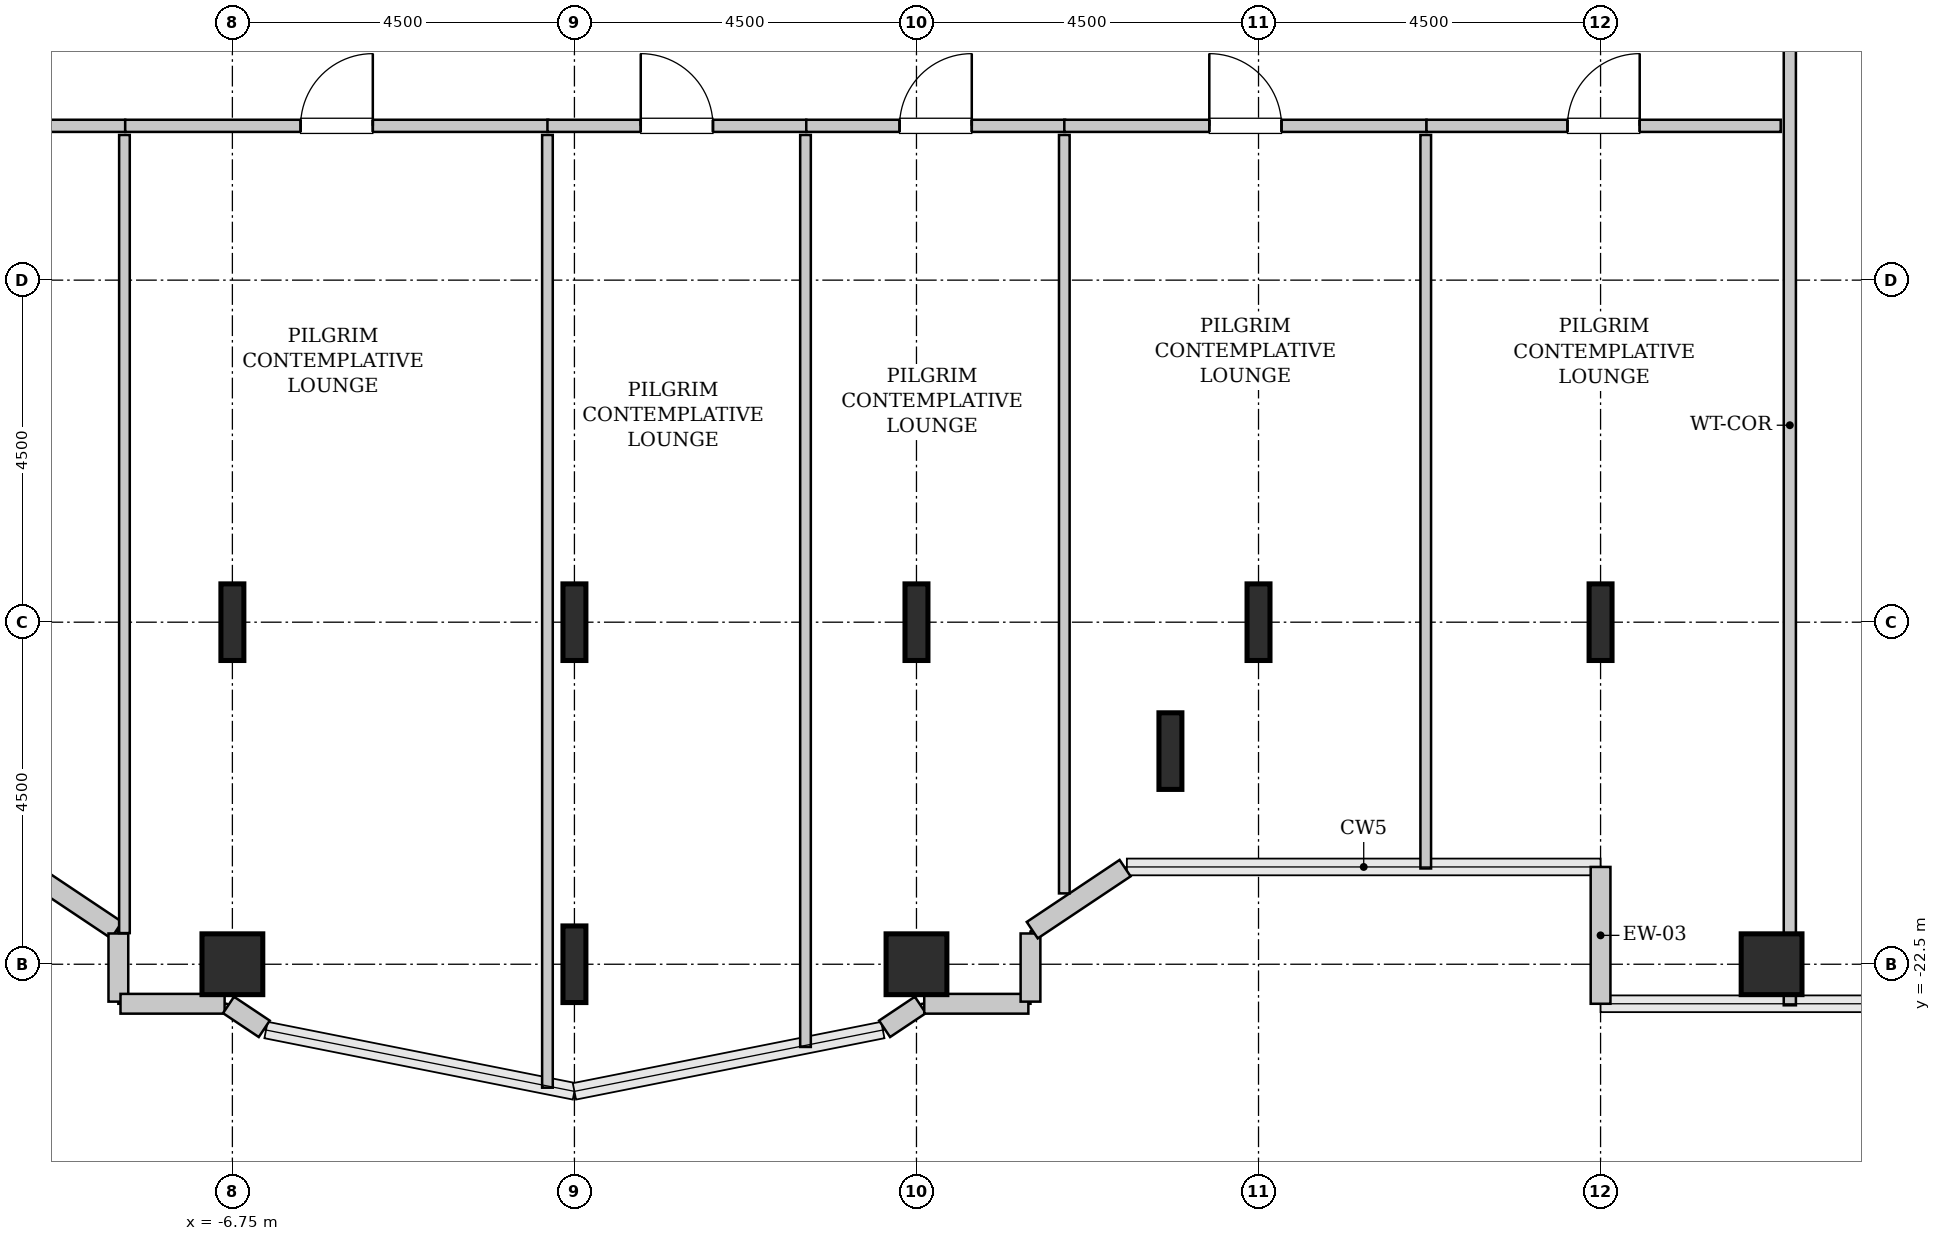
"""IFC4 building model, lengths in metres.
Left out: names, types, materials, properties, quantities, classifications, styles, units other than length and angle.
Written with IfcOpenShell. Run it as: python <this file> out.ifc"""

import sys

from ifc_helpers import new_model, si_unit, direction, frame, frame_2d, origin, origin_2d, place, context, subcontext, project, spatial, rectangle, hollow_rectangle, i_section, extrude, source, transform, mapped, element, fill, save


model = new_model("IFC4")
c1 = context("Model", 3, precision=1e-05, world=origin(), true_north=direction((0.0, 1.0)))
c2 = subcontext(c1, "Body", "Model", "MODEL_VIEW")
j1 = project(units=[si_unit("LENGTHUNIT", "METRE"), si_unit("PLANEANGLEUNIT", "RADIAN")], contexts=[c1])
p1 = place(None, origin())
s1 = spatial("IfcSite", under=j1, at=p1, CompositionType="ELEMENT")
p2 = place(p1, origin())
s2 = spatial("IfcBuilding", under=s1, at=p2, CompositionType="ELEMENT")
p3 = place(p2, frame((0.0, 0.0, 109.8)))
s3 = spatial("IfcBuildingStorey", under=s2, at=p3, CompositionType="ELEMENT", Elevation=109.8)
m1 = source(origin(), c2, "Body", "SweptSolid", [
    extrude(hollow_rectangle(XDim=0.8, YDim=0.8, WallThickness=0.04, InnerFilletRadius=0.04, OuterFilletRadius=0.08, at=origin_2d()), origin(), (0.0, 0.0, 1.0), 3.8),
])
p4 = place(p3, frame((-6.75, -22.5, 0.0), z_axis=(0.0, 0.0, 1.0), x_axis=(1.0, 0.0, 0.0)))
e1 = element("IfcColumn", 1, at=p4, inside=s3, PredefinedType="COLUMN", context=c2, shape_type="MappedRepresentation", body=[
    mapped(m1, transform((0.0, 0.0, 0.0), x_axis=(1.0, 0.0, 0.0), y_axis=(0.0, 1.0, 0.0), z_axis=(0.0, 0.0, 1.0), scale=1.0)),
])
m2 = source(origin(), c2, "Body", "SweptSolid", [
    extrude(i_section(OverallWidth=0.302, OverallDepth=1.008, WebThickness=0.021, FlangeThickness=0.04, FilletRadius=0.03, at=origin_2d()), origin(), (0.0, 0.0, 1.0), 3.8),
])
for number, where, z_axis, x_axis in (
    (2, (-6.75, -18.0, 0.0), (0.0, 0.0, 1.0), (1.0, 0.0, 0.0)),
    (3, (-2.25, -22.5, 0.0), (0.0, 0.0, 1.0), (1.0, 0.0, 0.0)),
    (4, (-2.25, -18.0, 0.0), (0.0, 0.0, 1.0), (1.0, 0.0, 0.0)),
):
    element("IfcColumn", number, at=place(p3, frame(where, z_axis=z_axis, x_axis=x_axis)), inside=s3, PredefinedType="COLUMN", context=c2, shape_type="MappedRepresentation", body=[
        mapped(m2, transform((0.0, 0.0, 0.0), x_axis=(1.0, 0.0, 0.0), y_axis=(0.0, 1.0, 0.0), z_axis=(0.0, 0.0, 1.0), scale=1.0)),
    ])
p5 = place(p3, frame((2.25, -22.5, 0.0), z_axis=(0.0, 0.0, 1.0), x_axis=(1.0, 0.0, 0.0)))
e5 = element("IfcColumn", 5, at=p5, inside=s3, PredefinedType="COLUMN", context=c2, shape_type="MappedRepresentation", body=[
    mapped(m1, transform((0.0, 0.0, 0.0), x_axis=(1.0, 0.0, 0.0), y_axis=(0.0, 1.0, 0.0), z_axis=(0.0, 0.0, 1.0), scale=1.0)),
])
for number, where, z_axis, x_axis in (
    (6, (2.25, -18.0, 0.0), (0.0, 0.0, 1.0), (1.0, 0.0, 0.0)),
    (7, (5.591, -19.696, 0.0), (0.0, 0.0, 1.0), (1.0, 0.0, 0.0)),
    (8, (6.75, -18.0, 0.0), (0.0, 0.0, 1.0), (1.0, 0.0, 0.0)),
    (9, (11.25, -18.0, 0.0), (0.0, 0.0, 1.0), (1.0, 0.0, 0.0)),
):
    element("IfcColumn", number, at=place(p3, frame(where, z_axis=z_axis, x_axis=x_axis)), inside=s3, PredefinedType="COLUMN", context=c2, shape_type="MappedRepresentation", body=[
        mapped(m2, transform((0.0, 0.0, 0.0), x_axis=(1.0, 0.0, 0.0), y_axis=(0.0, 1.0, 0.0), z_axis=(0.0, 0.0, 1.0), scale=1.0)),
    ])
p6 = place(p3, frame((13.5, -22.5, 0.0), z_axis=(0.0, 0.0, 1.0), x_axis=(1.0, 0.0, 0.0)))
e10 = element("IfcColumn", 10, at=p6, inside=s3, PredefinedType="COLUMN", context=c2, shape_type="MappedRepresentation", body=[
    mapped(m1, transform((0.0, 0.0, 0.0), x_axis=(1.0, 0.0, 0.0), y_axis=(0.0, 1.0, 0.0), z_axis=(0.0, 0.0, 1.0), scale=1.0)),
])
m3 = source(origin(), c2, "Body", "SweptSolid", [
    extrude(rectangle(XDim=1.8, YDim=0.26, at=frame_2d((0.9, 0.0))), origin(), (0.0, 0.0, 1.0), 3.55),
])
p7 = place(p3, frame((11.25, -21.22, 0.0), z_axis=(0.0, 0.0, 1.0), x_axis=(0.0, -1.0, 0.0)))
e11 = element("IfcWall", 11, at=p7, inside=s3, PredefinedType="SOLIDWALL", context=c2, shape_type="MappedRepresentation", body=[
    mapped(m3, transform((0.0, 0.0, 0.0), x_axis=(1.0, 0.0, 0.0), y_axis=(0.0, 1.0, 0.0), z_axis=(0.0, 0.0, 1.0), scale=1.0)),
])
m4 = source(origin(), c2, "Body", "SweptSolid", [
    extrude(rectangle(XDim=1.469, YDim=0.26, at=frame_2d((0.734, 0.0))), origin(), (0.0, 0.0, 1.0), 3.55),
])
p8 = place(p3, frame((-9.495, -21.236, 0.0), z_axis=(0.0, 0.0, 1.0), x_axis=(0.831461760506, -0.555581983884, 0.0)))
e12 = element("IfcWall", 12, at=p8, inside=s3, PredefinedType="SOLIDWALL", context=c2, shape_type="MappedRepresentation", body=[
    mapped(m4, transform((0.0, 0.0, 0.0), x_axis=(1.0, 0.0, 0.0), y_axis=(0.0, 1.0, 0.0), z_axis=(0.0, 0.0, 1.0), scale=1.0)),
])
m5 = source(origin(), c2, "Body", "SweptSolid", [
    extrude(rectangle(XDim=0.897, YDim=0.26, at=frame_2d((0.448, 0.0))), origin(), (0.0, 0.0, 1.0), 3.55),
])
p9 = place(p3, frame((-8.25, -22.095, 0.0), z_axis=(0.0, 0.0, 1.0), x_axis=(0.0, -1.0, 0.0)))
e13 = element("IfcWall", 13, at=p9, inside=s3, PredefinedType="SOLIDWALL", context=c2, shape_type="MappedRepresentation", body=[
    mapped(m5, transform((0.0, 0.0, 0.0), x_axis=(1.0, 0.0, 0.0), y_axis=(0.0, 1.0, 0.0), z_axis=(0.0, 0.0, 1.0), scale=1.0)),
])
m6 = source(origin(), c2, "Body", "SweptSolid", [
    extrude(rectangle(XDim=1.37, YDim=0.26, at=frame_2d((0.685, 0.0))), origin(), (0.0, 0.0, 1.0), 3.55),
])
p10 = place(p3, frame((-8.222, -23.02, 0.0), z_axis=(0.0, 0.0, 1.0), x_axis=(1.0, 0.0, 0.0)))
e14 = element("IfcWall", 14, at=p10, inside=s3, PredefinedType="SOLIDWALL", context=c2, shape_type="MappedRepresentation", body=[
    mapped(m6, transform((0.0, 0.0, 0.0), x_axis=(1.0, 0.0, 0.0), y_axis=(0.0, 1.0, 0.0), z_axis=(0.0, 0.0, 1.0), scale=1.0)),
])
m7 = source(origin(), c2, "Body", "SweptSolid", [
    extrude(rectangle(XDim=0.565, YDim=0.26, at=frame_2d((0.283, 0.0))), origin(), (0.0, 0.0, 1.0), 3.55),
])
for number, where, z_axis, x_axis in (
    (15, (-6.801, -23.036, 0.0), (0.0, 0.0, 1.0), (0.832, -0.555, 0.0)),
    (16, (1.831, -23.35, 0.0), (0.0, 0.0, 1.0), (0.832, 0.555, 0.0)),
):
    element("IfcWall", number, at=place(p3, frame(where, z_axis=z_axis, x_axis=x_axis)), inside=s3, PredefinedType="SOLIDWALL", context=c2, shape_type="MappedRepresentation", body=[
        mapped(m7, transform((0.0, 0.0, 0.0), x_axis=(1.0, 0.0, 0.0), y_axis=(0.0, 1.0, 0.0), z_axis=(0.0, 0.0, 1.0), scale=1.0)),
    ])
p11 = place(p3, frame((2.352, -23.02, 0.0), z_axis=(0.0, 0.0, 1.0), x_axis=(1.0, 0.0, 0.0)))
e17 = element("IfcWall", 17, at=p11, inside=s3, PredefinedType="SOLIDWALL", context=c2, shape_type="MappedRepresentation", body=[
    mapped(m6, transform((0.0, 0.0, 0.0), x_axis=(1.0, 0.0, 0.0), y_axis=(0.0, 1.0, 0.0), z_axis=(0.0, 0.0, 1.0), scale=1.0)),
])
p12 = place(p3, frame((3.75, -22.992, 0.0), z_axis=(0.0, 0.0, 1.0), x_axis=(0.0, 1.0, 0.0)))
e18 = element("IfcWall", 18, at=p12, inside=s3, PredefinedType="SOLIDWALL", context=c2, shape_type="MappedRepresentation", body=[
    mapped(m5, transform((0.0, 0.0, 0.0), x_axis=(1.0, 0.0, 0.0), y_axis=(0.0, 1.0, 0.0), z_axis=(0.0, 0.0, 1.0), scale=1.0)),
])
p13 = place(p3, frame((3.773, -22.052, 0.0), z_axis=(0.0, 0.0, 1.0), x_axis=(0.831461760506, 0.555581983884, 0.0)))
e19 = element("IfcWall", 19, at=p13, inside=s3, PredefinedType="SOLIDWALL", context=c2, shape_type="MappedRepresentation", body=[
    mapped(m4, transform((0.0, 0.0, 0.0), x_axis=(1.0, 0.0, 0.0), y_axis=(0.0, 1.0, 0.0), z_axis=(0.0, 0.0, 1.0), scale=1.0)),
])
m8 = source(origin(), c2, "Body", "SweptSolid", [
    extrude(rectangle(XDim=19.845, YDim=0.16, at=frame_2d((9.922, 0.0))), origin(), (0.0, 0.0, 1.0), 3.535),
])
p14 = place(p3, frame((13.74, -23.04, 0.0), z_axis=(0.0, 0.0, 1.0), x_axis=(0.0, 1.0, 0.0)))
e20 = element("IfcWall", 20, at=p14, inside=s3, PredefinedType="PARTITIONING", context=c2, shape_type="MappedRepresentation", body=[
    mapped(m8, transform((0.0, 0.0, 0.0), x_axis=(1.0, 0.0, 0.0), y_axis=(0.0, 1.0, 0.0), z_axis=(0.0, 0.0, 1.0), scale=1.0)),
])
p15 = place(p14, frame((15.212, 0.0, 0.0)))
e21 = element("IfcOpeningElement", 21, at=p15, cuts=e20, PredefinedType="OPENING", context=c2, shape_type="SweptSolid", body=[
    extrude(rectangle(XDim=0.95, YDim=2.1, at=frame_2d((0.475, 1.05))), frame((0.0, 0.09, 0.0), z_axis=(0.0, -1.0, 0.0), x_axis=(1.0, 0.0, 0.0)), (0.0, 0.0, 1.0), 0.18),
])
m9 = source(origin(), c2, "Body", "SweptSolid", [
    extrude(rectangle(XDim=5.46, YDim=0.16, at=frame_2d((2.73, 0.0))), origin(), (0.0, 0.0, 1.0), 3.535),
])
p16 = place(p3, frame((-13.62, -11.47, 0.0), z_axis=(0.0, 0.0, 1.0), x_axis=(1.0, 0.0, 0.0)))
e22 = element("IfcWall", 22, at=p16, inside=s3, PredefinedType="PARTITIONING", context=c2, shape_type="MappedRepresentation", body=[
    mapped(m9, transform((0.0, 0.0, 0.0), x_axis=(1.0, 0.0, 0.0), y_axis=(0.0, 1.0, 0.0), z_axis=(0.0, 0.0, 1.0), scale=1.0)),
])
p17 = place(p16, frame((2.255, 0.0, 0.0)))
e23 = element("IfcOpeningElement", 23, at=p17, cuts=e22, PredefinedType="OPENING", context=c2, shape_type="SweptSolid", body=[
    extrude(rectangle(XDim=0.95, YDim=2.1, at=frame_2d((0.475, 1.05))), frame((0.0, 0.09, 0.0), z_axis=(0.0, -1.0, 0.0), x_axis=(1.0, 0.0, 0.0)), (0.0, 0.0, 1.0), 0.18),
])
m10 = source(origin(), c2, "Body", "SweptSolid", [
    extrude(rectangle(XDim=10.5, YDim=0.14, at=frame_2d((5.25, 0.0))), origin(), (0.0, 0.0, 1.0), 3.535),
])
p18 = place(p3, frame((-8.17, -22.09, 0.0), z_axis=(0.0, 0.0, 1.0), x_axis=(0.0, 1.0, 0.0)))
e24 = element("IfcWall", 24, at=p18, inside=s3, PredefinedType="PARTITIONING", context=c2, shape_type="MappedRepresentation", body=[
    mapped(m10, transform((0.0, 0.0, 0.0), x_axis=(1.0, 0.0, 0.0), y_axis=(0.0, 1.0, 0.0), z_axis=(0.0, 0.0, 1.0), scale=1.0)),
])
m11 = source(origin(), c2, "Body", "SweptSolid", [
    extrude(rectangle(XDim=5.565, YDim=0.16, at=frame_2d((2.782, 0.0))), origin(), (0.0, 0.0, 1.0), 3.535),
])
p19 = place(p3, frame((-8.16, -11.47, 0.0), z_axis=(0.0, 0.0, 1.0), x_axis=(1.0, 0.0, 0.0)))
e25 = element("IfcWall", 25, at=p19, inside=s3, PredefinedType="PARTITIONING", context=c2, shape_type="MappedRepresentation", body=[
    mapped(m11, transform((0.0, 0.0, 0.0), x_axis=(1.0, 0.0, 0.0), y_axis=(0.0, 1.0, 0.0), z_axis=(0.0, 0.0, 1.0), scale=1.0)),
])
p20 = place(p19, frame((2.308, 0.0, 0.0)))
e26 = element("IfcOpeningElement", 26, at=p20, cuts=e25, PredefinedType="OPENING", context=c2, shape_type="SweptSolid", body=[
    extrude(rectangle(XDim=0.95, YDim=2.1, at=frame_2d((0.475, 1.05))), frame((0.0, 0.09, 0.0), z_axis=(0.0, -1.0, 0.0), x_axis=(1.0, 0.0, 0.0)), (0.0, 0.0, 1.0), 0.18),
])
m12 = source(origin(), c2, "Body", "SweptSolid", [
    extrude(rectangle(XDim=12.534, YDim=0.14, at=frame_2d((6.267, 0.0))), origin(), (0.0, 0.0, 1.0), 2.875),
])
p21 = place(p3, frame((-2.605, -24.124, 0.0), z_axis=(0.0, 0.0, 1.0), x_axis=(0.0, 1.0, 0.0)))
e27 = element("IfcWall", 27, at=p21, inside=s3, PredefinedType="PARTITIONING", context=c2, shape_type="MappedRepresentation", body=[
    mapped(m12, transform((0.0, 0.0, 0.0), x_axis=(1.0, 0.0, 0.0), y_axis=(0.0, 1.0, 0.0), z_axis=(0.0, 0.0, 1.0), scale=1.0)),
])
m13 = source(origin(), c2, "Body", "SweptSolid", [
    extrude(rectangle(XDim=3.405, YDim=0.16, at=frame_2d((1.703, 0.0))), origin(), (0.0, 0.0, 1.0), 3.535),
])
p22 = place(p3, frame((-2.605, -11.47, 0.0), z_axis=(0.0, 0.0, 1.0), x_axis=(1.0, 0.0, 0.0)))
e28 = element("IfcWall", 28, at=p22, inside=s3, PredefinedType="PARTITIONING", context=c2, shape_type="MappedRepresentation", body=[
    mapped(m13, transform((0.0, 0.0, 0.0), x_axis=(1.0, 0.0, 0.0), y_axis=(0.0, 1.0, 0.0), z_axis=(0.0, 0.0, 1.0), scale=1.0)),
])
p23 = place(p22, frame((1.228, 0.0, 0.0)))
e29 = element("IfcOpeningElement", 29, at=p23, cuts=e28, PredefinedType="OPENING", context=c2, shape_type="SweptSolid", body=[
    extrude(rectangle(XDim=0.95, YDim=2.1, at=frame_2d((0.475, 1.05))), frame((0.0, 0.09, 0.0), z_axis=(0.0, -1.0, 0.0), x_axis=(1.0, 0.0, 0.0)), (0.0, 0.0, 1.0), 0.18),
])
m14 = source(origin(), c2, "Body", "SweptSolid", [
    extrude(rectangle(XDim=11.998, YDim=0.14, at=frame_2d((5.999, 0.0))), origin(), (0.0, 0.0, 1.0), 3.535),
])
p24 = place(p3, frame((0.79, -23.588, 0.0), z_axis=(0.0, 0.0, 1.0), x_axis=(0.0, 1.0, 0.0)))
e30 = element("IfcWall", 30, at=p24, inside=s3, PredefinedType="PARTITIONING", context=c2, shape_type="MappedRepresentation", body=[
    mapped(m14, transform((0.0, 0.0, 0.0), x_axis=(1.0, 0.0, 0.0), y_axis=(0.0, 1.0, 0.0), z_axis=(0.0, 0.0, 1.0), scale=1.0)),
])
p25 = place(p3, frame((0.8, -11.47, 0.0), z_axis=(0.0, 0.0, 1.0), x_axis=(1.0, 0.0, 0.0)))
e31 = element("IfcWall", 31, at=p25, inside=s3, PredefinedType="PARTITIONING", context=c2, shape_type="MappedRepresentation", body=[
    mapped(m13, transform((0.0, 0.0, 0.0), x_axis=(1.0, 0.0, 0.0), y_axis=(0.0, 1.0, 0.0), z_axis=(0.0, 0.0, 1.0), scale=1.0)),
])
p26 = place(p25, frame((1.228, 0.0, 0.0)))
e32 = element("IfcOpeningElement", 32, at=p26, cuts=e31, PredefinedType="OPENING", context=c2, shape_type="SweptSolid", body=[
    extrude(rectangle(XDim=0.95, YDim=2.1, at=frame_2d((0.475, 1.05))), frame((0.0, 0.09, 0.0), z_axis=(0.0, -1.0, 0.0), x_axis=(1.0, 0.0, 0.0)), (0.0, 0.0, 1.0), 0.18),
])
m15 = source(origin(), c2, "Body", "SweptSolid", [
    extrude(rectangle(XDim=9.978, YDim=0.14, at=frame_2d((4.989, 0.0))), origin(), (0.0, 0.0, 1.0), 3.535),
])
p27 = place(p3, frame((4.195, -21.568, 0.0), z_axis=(0.0, 0.0, 1.0), x_axis=(0.0, 1.0, 0.0)))
e33 = element("IfcWall", 33, at=p27, inside=s3, PredefinedType="PARTITIONING", context=c2, shape_type="MappedRepresentation", body=[
    mapped(m15, transform((0.0, 0.0, 0.0), x_axis=(1.0, 0.0, 0.0), y_axis=(0.0, 1.0, 0.0), z_axis=(0.0, 0.0, 1.0), scale=1.0)),
])
m16 = source(origin(), c2, "Body", "SweptSolid", [
    extrude(rectangle(XDim=4.765, YDim=0.16, at=frame_2d((2.382, 0.0))), origin(), (0.0, 0.0, 1.0), 3.535),
])
p28 = place(p3, frame((4.195, -11.47, 0.0), z_axis=(0.0, 0.0, 1.0), x_axis=(1.0, 0.0, 0.0)))
e34 = element("IfcWall", 34, at=p28, inside=s3, PredefinedType="PARTITIONING", context=c2, shape_type="MappedRepresentation", body=[
    mapped(m16, transform((0.0, 0.0, 0.0), x_axis=(1.0, 0.0, 0.0), y_axis=(0.0, 1.0, 0.0), z_axis=(0.0, 0.0, 1.0), scale=1.0)),
])
p29 = place(p28, frame((1.907, 0.0, 0.0)))
e35 = element("IfcOpeningElement", 35, at=p29, cuts=e34, PredefinedType="OPENING", context=c2, shape_type="SweptSolid", body=[
    extrude(rectangle(XDim=0.95, YDim=2.1, at=frame_2d((0.475, 1.05))), frame((0.0, 0.09, 0.0), z_axis=(0.0, -1.0, 0.0), x_axis=(1.0, 0.0, 0.0)), (0.0, 0.0, 1.0), 0.18),
])
m17 = source(origin(), c2, "Body", "SweptSolid", [
    extrude(rectangle(XDim=9.65, YDim=0.14, at=frame_2d((4.825, 0.0))), origin(), (0.0, 0.0, 1.0), 3.535),
])
p30 = place(p3, frame((8.95, -21.24, 0.0), z_axis=(0.0, 0.0, 1.0), x_axis=(0.0, 1.0, 0.0)))
e36 = element("IfcWall", 36, at=p30, inside=s3, PredefinedType="PARTITIONING", context=c2, shape_type="MappedRepresentation", body=[
    mapped(m17, transform((0.0, 0.0, 0.0), x_axis=(1.0, 0.0, 0.0), y_axis=(0.0, 1.0, 0.0), z_axis=(0.0, 0.0, 1.0), scale=1.0)),
])
m18 = source(origin(), c2, "Body", "SweptSolid", [
    extrude(rectangle(XDim=4.66, YDim=0.16, at=frame_2d((2.33, 0.0))), origin(), (0.0, 0.0, 1.0), 3.535),
])
p31 = place(p3, frame((8.96, -11.47, 0.0), z_axis=(0.0, 0.0, 1.0), x_axis=(1.0, 0.0, 0.0)))
e37 = element("IfcWall", 37, at=p31, inside=s3, PredefinedType="PARTITIONING", context=c2, shape_type="MappedRepresentation", body=[
    mapped(m18, transform((0.0, 0.0, 0.0), x_axis=(1.0, 0.0, 0.0), y_axis=(0.0, 1.0, 0.0), z_axis=(0.0, 0.0, 1.0), scale=1.0)),
])
p32 = place(p31, frame((1.855, 0.0, 0.0)))
e38 = element("IfcOpeningElement", 38, at=p32, cuts=e37, PredefinedType="OPENING", context=c2, shape_type="SweptSolid", body=[
    extrude(rectangle(XDim=0.95, YDim=2.1, at=frame_2d((0.475, 1.05))), frame((0.0, 0.09, 0.0), z_axis=(0.0, -1.0, 0.0), x_axis=(1.0, 0.0, 0.0)), (0.0, 0.0, 1.0), 0.18),
])
m19 = source(origin(), c2, "Body", "SweptSolid", [
    extrude(rectangle(XDim=0.95, YDim=2.1, at=frame_2d((0.475, 1.05))), frame((0.0, 0.025, 0.0), z_axis=(0.0, -1.0, 0.0), x_axis=(1.0, 0.0, 0.0)), (0.0, 0.0, 1.0), 0.05),
])
p33 = place(p20, origin())
e39 = element("IfcDoor", 39, at=p33, inside=s3, OperationType="SINGLE_SWING_RIGHT", PredefinedType="DOOR", context=c2, shape_type="MappedRepresentation", body=[
    mapped(m19, transform((0.0, 0.0, 0.0), x_axis=(1.0, 0.0, 0.0), y_axis=(0.0, 1.0, 0.0), z_axis=(0.0, 0.0, 1.0), scale=1.0)),
])
fill(e26, e39)
p34 = place(p23, origin())
e40 = element("IfcDoor", 40, at=p34, inside=s3, OperationType="SINGLE_SWING_LEFT", PredefinedType="DOOR", context=c2, shape_type="MappedRepresentation", body=[
    mapped(m19, transform((0.0, 0.0, 0.0), x_axis=(1.0, 0.0, 0.0), y_axis=(0.0, 1.0, 0.0), z_axis=(0.0, 0.0, 1.0), scale=1.0)),
])
fill(e29, e40)
p35 = place(p26, origin())
e41 = element("IfcDoor", 41, at=p35, inside=s3, OperationType="SINGLE_SWING_RIGHT", PredefinedType="DOOR", context=c2, shape_type="MappedRepresentation", body=[
    mapped(m19, transform((0.0, 0.0, 0.0), x_axis=(1.0, 0.0, 0.0), y_axis=(0.0, 1.0, 0.0), z_axis=(0.0, 0.0, 1.0), scale=1.0)),
])
fill(e32, e41)
p36 = place(p29, origin())
e42 = element("IfcDoor", 42, at=p36, inside=s3, OperationType="SINGLE_SWING_LEFT", PredefinedType="DOOR", context=c2, shape_type="MappedRepresentation", body=[
    mapped(m19, transform((0.0, 0.0, 0.0), x_axis=(1.0, 0.0, 0.0), y_axis=(0.0, 1.0, 0.0), z_axis=(0.0, 0.0, 1.0), scale=1.0)),
])
fill(e35, e42)
p37 = place(p32, origin())
e43 = element("IfcDoor", 43, at=p37, inside=s3, OperationType="SINGLE_SWING_RIGHT", PredefinedType="DOOR", context=c2, shape_type="MappedRepresentation", body=[
    mapped(m19, transform((0.0, 0.0, 0.0), x_axis=(1.0, 0.0, 0.0), y_axis=(0.0, 1.0, 0.0), z_axis=(0.0, 0.0, 1.0), scale=1.0)),
])
fill(e38, e43)
save(model, sys.argv[1])
